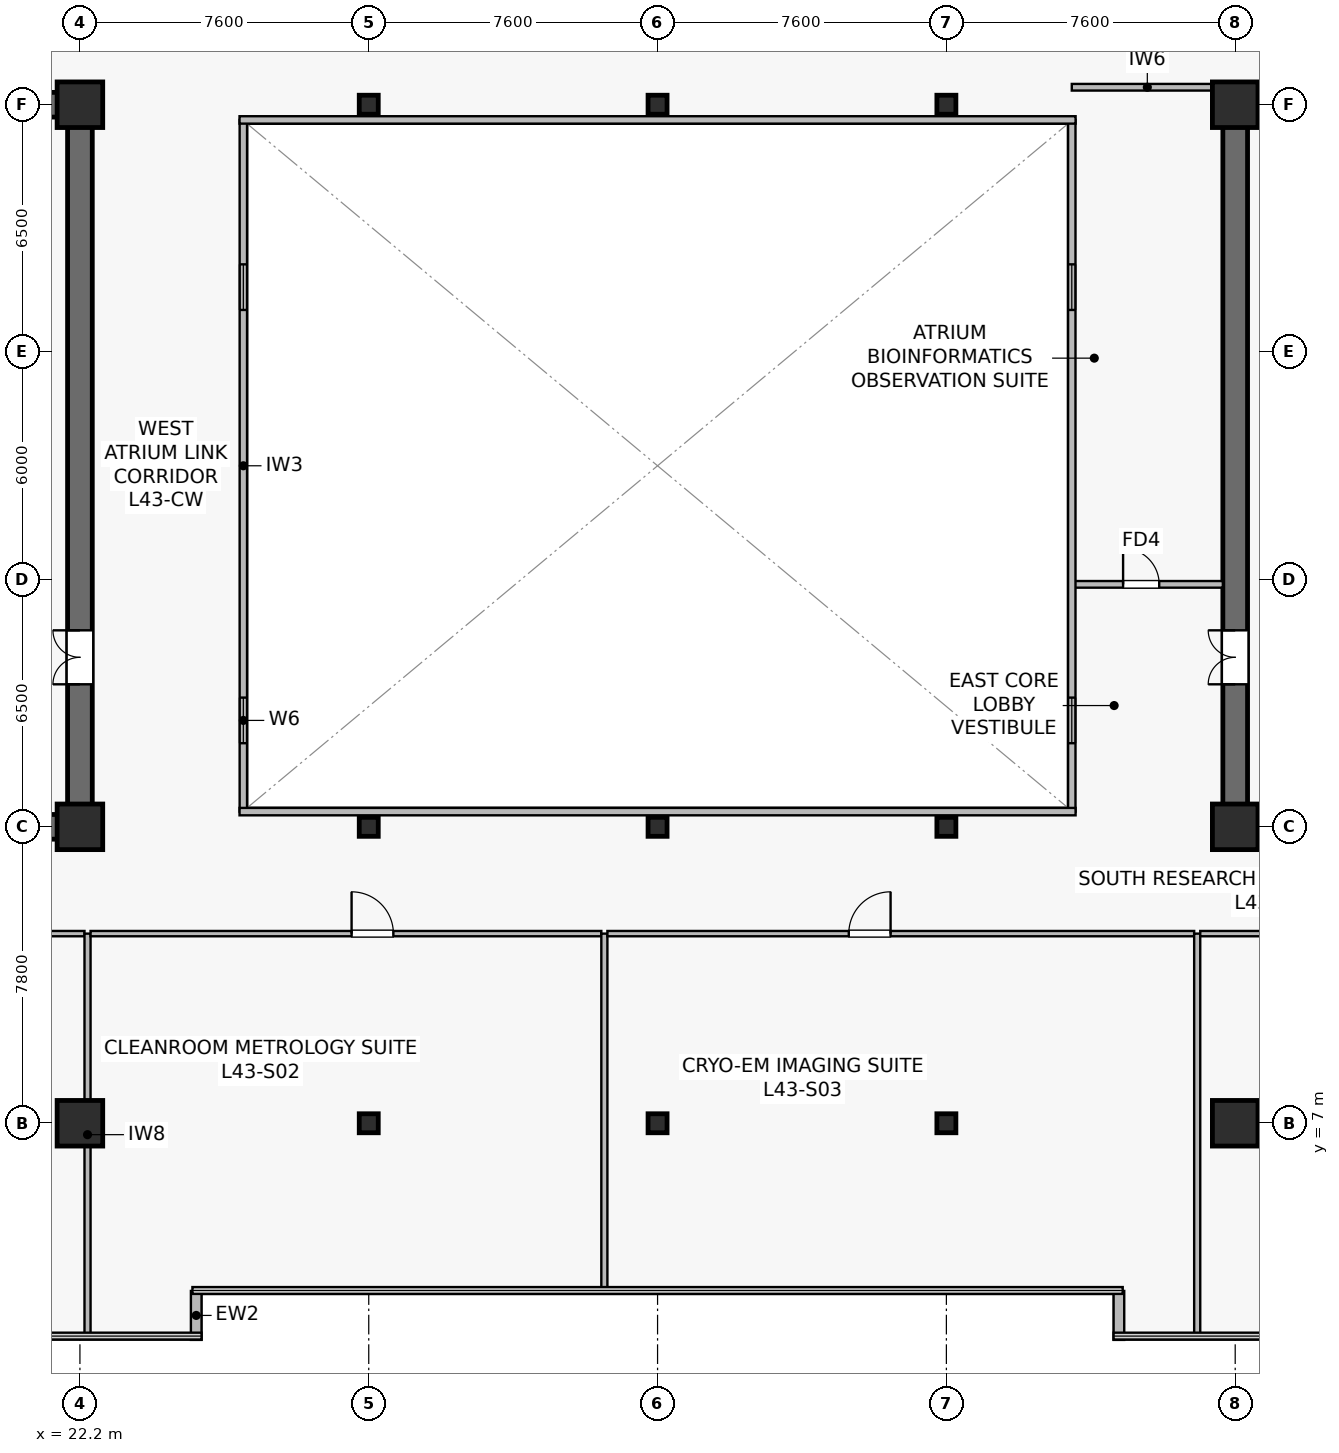
"""IFC4 building model, lengths in metres.
Left out: names, types, materials, properties, quantities, classifications, styles, units other than length and angle.
Written with IfcOpenShell. Run it as: python <this file> out.ifc"""

import sys

from ifc_helpers import new_model, si_unit, direction, frame, frame_2d, origin, origin_2d, place, context, subcontext, project, spatial, rectangle, hollow_rectangle, extrude, source, transform, mapped, element, fill, save


model = new_model("IFC4")
c1 = context("Model", 3, precision=1e-05, world=origin(), true_north=direction((0.0, 1.0)))
c2 = subcontext(c1, "Body", "Model", "MODEL_VIEW")
j1 = project(units=[si_unit("LENGTHUNIT", "METRE"), si_unit("PLANEANGLEUNIT", "RADIAN")], contexts=[c1])
p1 = place(None, origin())
s1 = spatial("IfcSite", under=j1, at=p1, CompositionType="ELEMENT")
p2 = place(p1, origin())
s2 = spatial("IfcBuilding", under=s1, at=p2, CompositionType="ELEMENT")
p3 = place(p2, frame((0.0, 0.0, 178.9)))
s3 = spatial("IfcBuildingStorey", under=s2, at=p3, CompositionType="ELEMENT", Elevation=178.9)
p4 = place(p3, frame((7.075, 14.8, 0.0), z_axis=(0.0, 0.0, 1.0), x_axis=(1.0, 0.0, 0.0)))
e1 = element("IfcWall", 1, at=p4, inside=s3, PredefinedType="SHEAR", context=c2, shape_type="SweptSolid", body=[
    extrude(rectangle(XDim=15.45, YDim=0.65, at=frame_2d((7.725, 0.0))), origin(), (0.0, 0.0, 1.0), 3.79),
])
p5 = place(p3, frame((7.075, 33.8, 0.0), z_axis=(0.0, 0.0, 1.0), x_axis=(1.0, 0.0, 0.0)))
e2 = element("IfcWall", 2, at=p5, inside=s3, PredefinedType="SHEAR", context=c2, shape_type="SweptSolid", body=[
    extrude(rectangle(XDim=15.45, YDim=0.65, at=frame_2d((7.725, 0.0))), origin(), (0.0, 0.0, 1.0), 3.79),
])
p6 = place(p5, frame((6.825, 0.0, 0.0)))
e3 = element("IfcOpeningElement", 3, at=p6, cuts=e2, PredefinedType="OPENING", context=c2, shape_type="SweptSolid", body=[
    extrude(rectangle(XDim=0.95, YDim=2.15, at=frame_2d((0.475, 1.075))), frame((0.0, 0.335, 0.0), z_axis=(0.0, -1.0, 0.0), x_axis=(1.0, 0.0, 0.0)), (0.0, 0.0, 1.0), 0.67),
])
p7 = place(p5, frame((11.89, 0.0, 0.0)))
e4 = element("IfcOpeningElement", 4, at=p7, cuts=e2, PredefinedType="OPENING", context=c2, shape_type="SweptSolid", body=[
    extrude(rectangle(XDim=0.95, YDim=2.15, at=frame_2d((0.475, 1.075))), frame((0.0, 0.335, 0.0), z_axis=(0.0, -1.0, 0.0), x_axis=(1.0, 0.0, 0.0)), (0.0, 0.0, 1.0), 0.67),
])
p8 = place(p3, frame((22.2, 15.125, 0.0), z_axis=(0.0, 0.0, 1.0), x_axis=(0.0, 1.0, 0.0)))
e5 = element("IfcWall", 5, at=p8, inside=s3, PredefinedType="SHEAR", context=c2, shape_type="SweptSolid", body=[
    extrude(rectangle(XDim=18.35, YDim=0.65, at=frame_2d((9.175, 0.0))), origin(), (0.0, 0.0, 1.0), 3.79),
])
p9 = place(p8, frame((3.425, 0.0, 0.0)))
e6 = element("IfcOpeningElement", 6, at=p9, cuts=e5, PredefinedType="OPENING", context=c2, shape_type="SweptSolid", body=[
    extrude(rectangle(XDim=1.42, YDim=2.2, at=frame_2d((0.71, 1.1))), frame((0.0, 0.335, 0.0), z_axis=(0.0, -1.0, 0.0), x_axis=(1.0, 0.0, 0.0)), (0.0, 0.0, 1.0), 0.67),
])
p10 = place(p3, frame((52.275, 14.8, 0.0), z_axis=(0.0, 0.0, 1.0), x_axis=(1.0, 0.0, 0.0)))
e7 = element("IfcWall", 7, at=p10, inside=s3, PredefinedType="SHEAR", context=c2, shape_type="SweptSolid", body=[
    extrude(rectangle(XDim=15.45, YDim=0.65, at=frame_2d((7.725, 0.0))), origin(), (0.0, 0.0, 1.0), 3.79),
])
p11 = place(p3, frame((52.275, 33.8, 0.0), z_axis=(0.0, 0.0, 1.0), x_axis=(1.0, 0.0, 0.0)))
e8 = element("IfcWall", 8, at=p11, inside=s3, PredefinedType="SHEAR", context=c2, shape_type="SweptSolid", body=[
    extrude(rectangle(XDim=15.45, YDim=0.65, at=frame_2d((7.725, 0.0))), origin(), (0.0, 0.0, 1.0), 3.79),
])
p12 = place(p11, frame((7.675, 0.0, 0.0)))
e9 = element("IfcOpeningElement", 9, at=p12, cuts=e8, PredefinedType="OPENING", context=c2, shape_type="SweptSolid", body=[
    extrude(rectangle(XDim=0.95, YDim=2.15, at=frame_2d((0.475, 1.075))), frame((0.0, 0.335, 0.0), z_axis=(0.0, -1.0, 0.0), x_axis=(1.0, 0.0, 0.0)), (0.0, 0.0, 1.0), 0.67),
])
p13 = place(p11, frame((2.61, 0.0, 0.0)))
e10 = element("IfcOpeningElement", 10, at=p13, cuts=e8, PredefinedType="OPENING", context=c2, shape_type="SweptSolid", body=[
    extrude(rectangle(XDim=0.95, YDim=2.15, at=frame_2d((0.475, 1.075))), frame((0.0, 0.335, 0.0), z_axis=(0.0, -1.0, 0.0), x_axis=(1.0, 0.0, 0.0)), (0.0, 0.0, 1.0), 0.67),
])
p14 = place(p3, frame((52.6, 15.125, 0.0), z_axis=(0.0, 0.0, 1.0), x_axis=(0.0, 1.0, 0.0)))
e11 = element("IfcWall", 11, at=p14, inside=s3, PredefinedType="SHEAR", context=c2, shape_type="SweptSolid", body=[
    extrude(rectangle(XDim=18.35, YDim=0.65, at=frame_2d((9.175, 0.0))), origin(), (0.0, 0.0, 1.0), 3.79),
])
p15 = place(p14, frame((3.425, 0.0, 0.0)))
e12 = element("IfcOpeningElement", 12, at=p15, cuts=e11, PredefinedType="OPENING", context=c2, shape_type="SweptSolid", body=[
    extrude(rectangle(XDim=1.42, YDim=2.2, at=frame_2d((0.71, 1.1))), frame((0.0, 0.335, 0.0), z_axis=(0.0, -1.0, 0.0), x_axis=(1.0, 0.0, 0.0)), (0.0, 0.0, 1.0), 0.67),
])
m1 = source(origin(), c2, "Body", "SweptSolid", [
    extrude(rectangle(XDim=1.2, YDim=1.2, at=origin_2d()), origin(), (0.0, 0.0, 1.0), 4.1),
])
for number, where, z_axis, x_axis in (
    (13, (22.2, 7.0, 0.0), (0.0, 0.0, 1.0), (1.0, 0.0, 0.0)),
    (14, (22.2, 14.8, 0.0), (0.0, 0.0, 1.0), (1.0, 0.0, 0.0)),
    (15, (22.2, 33.8, 0.0), (0.0, 0.0, 1.0), (1.0, 0.0, 0.0)),
    (16, (52.6, 7.0, 0.0), (0.0, 0.0, 1.0), (1.0, 0.0, 0.0)),
    (17, (52.6, 14.8, 0.0), (0.0, 0.0, 1.0), (1.0, 0.0, 0.0)),
    (18, (52.6, 33.8, 0.0), (0.0, 0.0, 1.0), (1.0, 0.0, 0.0)),
):
    element("IfcColumn", number, at=place(p3, frame(where, z_axis=z_axis, x_axis=x_axis)), inside=s3, PredefinedType="COLUMN", context=c2, shape_type="MappedRepresentation", body=[
        mapped(m1, transform((0.0, 0.0, 0.0), scale=1.0)),
    ])
m2 = source(origin(), c2, "Body", "SweptSolid", [
    extrude(hollow_rectangle(XDim=0.5, YDim=0.5, WallThickness=0.022, at=origin_2d()), origin(), (0.0, 0.0, 1.0), 4.1),
])
for number, where, z_axis, x_axis in (
    (19, (29.8, 7.0, 0.0), (0.0, 0.0, 1.0), (1.0, 0.0, 0.0)),
    (20, (29.8, 14.8, 0.0), (0.0, 0.0, 1.0), (1.0, 0.0, 0.0)),
    (21, (29.8, 33.8, 0.0), (0.0, 0.0, 1.0), (1.0, 0.0, 0.0)),
    (22, (37.4, 7.0, 0.0), (0.0, 0.0, 1.0), (1.0, 0.0, 0.0)),
    (23, (37.4, 14.8, 0.0), (0.0, 0.0, 1.0), (1.0, 0.0, 0.0)),
    (24, (37.4, 33.8, 0.0), (0.0, 0.0, 1.0), (1.0, 0.0, 0.0)),
    (25, (45.0, 7.0, 0.0), (0.0, 0.0, 1.0), (1.0, 0.0, 0.0)),
    (26, (45.0, 14.8, 0.0), (0.0, 0.0, 1.0), (1.0, 0.0, 0.0)),
    (27, (45.0, 33.8, 0.0), (0.0, 0.0, 1.0), (1.0, 0.0, 0.0)),
):
    element("IfcColumn", number, at=place(p3, frame(where, z_axis=z_axis, x_axis=x_axis)), inside=s3, PredefinedType="COLUMN", context=c2, shape_type="MappedRepresentation", body=[
        mapped(m2, transform((0.0, 0.0, 0.0), scale=1.0)),
    ])
for number, where, z_axis, x_axis in (
    (28, (25.26, 1.3, 0.0), (0.0, 0.0, 1.0), (0.0, 1.0, 0.0)),
    (29, (49.54, 2.588, 0.0), (0.0, 0.0, 1.0), (0.0, -1.0, 0.0)),
):
    element("IfcWall", number, at=place(p3, frame(where, z_axis=z_axis, x_axis=x_axis)), inside=s3, PredefinedType="STANDARD", context=c2, shape_type="SweptSolid", body=[
        extrude(rectangle(XDim=1.288, YDim=0.28, at=frame_2d((0.644, 0.0))), origin(), (0.0, 0.0, 1.0), 3.79),
    ])
p16 = place(p3, frame((48.3, 34.26, 0.0), z_axis=(0.0, 0.0, 1.0), x_axis=(1.0, 0.0, 0.0)))
e30 = element("IfcWall", 30, at=p16, inside=s3, PredefinedType="PARTITIONING", context=c2, shape_type="SweptSolid", body=[
    extrude(rectangle(XDim=3.975, YDim=0.175, at=frame_2d((1.987, 0.0))), origin(), (0.0, 0.0, 1.0), 3.475),
])
p17 = place(p3, frame((48.3, 21.18, 0.0), z_axis=(0.0, 0.0, 1.0), x_axis=(1.0, 0.0, 0.0)))
e31 = element("IfcWall", 31, at=p17, inside=s3, PredefinedType="PARTITIONING", context=c2, shape_type="SweptSolid", body=[
    extrude(rectangle(XDim=3.975, YDim=0.175, at=frame_2d((1.987, 0.0))), origin(), (0.0, 0.0, 1.0), 3.79),
])
p18 = place(p17, frame((1.35, 0.0, 0.0)))
e32 = element("IfcOpeningElement", 32, at=p18, cuts=e31, PredefinedType="OPENING", context=c2, shape_type="SweptSolid", body=[
    extrude(rectangle(XDim=0.95, YDim=2.15, at=frame_2d((0.475, 1.075))), frame((0.0, 0.098, 0.0), z_axis=(0.0, -1.0, 0.0), x_axis=(1.0, 0.0, 0.0)), (0.0, 0.0, 1.0), 0.195),
])
p19 = place(p3, frame((26.5, 15.2, 0.0), z_axis=(0.0, 0.0, 1.0), x_axis=(0.0, 1.0, 0.0)))
e33 = element("IfcWall", 33, at=p19, inside=s3, PredefinedType="SOLIDWALL", context=c2, shape_type="SweptSolid", body=[
    extrude(rectangle(XDim=18.2, YDim=0.195, at=frame_2d((9.1, 0.0))), origin(), (0.0, 0.0, 1.0), 3.79),
])
p20 = place(p19, frame((1.8, 0.0, 0.9)))
e34 = element("IfcOpeningElement", 34, at=p20, cuts=e33, PredefinedType="OPENING", context=c2, shape_type="SweptSolid", body=[
    extrude(rectangle(XDim=1.2, YDim=1.35, at=frame_2d((0.6, 0.675))), frame((0.0, 0.107, 0.0), z_axis=(0.0, -1.0, 0.0), x_axis=(1.0, 0.0, 0.0)), (0.0, 0.0, 1.0), 0.215),
])
p21 = place(p19, frame((13.2, 0.0, 0.9)))
e35 = element("IfcOpeningElement", 35, at=p21, cuts=e33, PredefinedType="OPENING", context=c2, shape_type="SweptSolid", body=[
    extrude(rectangle(XDim=1.2, YDim=1.35, at=frame_2d((0.6, 0.675))), frame((0.0, 0.107, 0.0), z_axis=(0.0, -1.0, 0.0), x_axis=(1.0, 0.0, 0.0)), (0.0, 0.0, 1.0), 0.215),
])
p22 = place(p3, frame((48.3, 15.2, 0.0), z_axis=(0.0, 0.0, 1.0), x_axis=(0.0, 1.0, 0.0)))
e36 = element("IfcWall", 36, at=p22, inside=s3, PredefinedType="SOLIDWALL", context=c2, shape_type="SweptSolid", body=[
    extrude(rectangle(XDim=18.2, YDim=0.195, at=frame_2d((9.1, 0.0))), origin(), (0.0, 0.0, 1.0), 3.79),
])
p23 = place(p22, frame((1.8, 0.0, 0.9)))
e37 = element("IfcOpeningElement", 37, at=p23, cuts=e36, PredefinedType="OPENING", context=c2, shape_type="SweptSolid", body=[
    extrude(rectangle(XDim=1.2, YDim=1.35, at=frame_2d((0.6, 0.675))), frame((0.0, 0.107, 0.0), z_axis=(0.0, -1.0, 0.0), x_axis=(1.0, 0.0, 0.0)), (0.0, 0.0, 1.0), 0.215),
])
p24 = place(p22, frame((13.2, 0.0, 0.9)))
e38 = element("IfcOpeningElement", 38, at=p24, cuts=e36, PredefinedType="OPENING", context=c2, shape_type="SweptSolid", body=[
    extrude(rectangle(XDim=1.2, YDim=1.35, at=frame_2d((0.6, 0.675))), frame((0.0, 0.107, 0.0), z_axis=(0.0, -1.0, 0.0), x_axis=(1.0, 0.0, 0.0)), (0.0, 0.0, 1.0), 0.215),
])
for number, where, z_axis, x_axis in (
    (39, (26.4, 15.2, 0.0), (0.0, 0.0, 1.0), (1.0, 0.0, 0.0)),
    (40, (26.4, 33.4, 0.0), (0.0, 0.0, 1.0), (1.0, 0.0, 0.0)),
):
    element("IfcWall", number, at=place(p3, frame(where, z_axis=z_axis, x_axis=x_axis)), inside=s3, PredefinedType="SOLIDWALL", context=c2, shape_type="SweptSolid", body=[
        extrude(rectangle(XDim=22.0, YDim=0.195, at=frame_2d((11.0, 0.0))), origin(), (0.0, 0.0, 1.0), 3.79),
    ])
p25 = place(p3, frame((6.98, 11.99, 0.0), z_axis=(0.0, 0.0, 1.0), x_axis=(1.0, 0.0, 0.0)))
e41 = element("IfcWall", 41, at=p25, inside=s3, PredefinedType="PARTITIONING", context=c2, shape_type="SweptSolid", body=[
    extrude(rectangle(XDim=15.34, YDim=0.14, at=frame_2d((7.67, 0.0))), origin(), (0.0, 0.0, 1.0), 3.187),
])
p26 = place(p25, frame((6.308, 0.0, 0.0)))
e42 = element("IfcOpeningElement", 42, at=p26, cuts=e41, PredefinedType="OPENING", context=c2, shape_type="SweptSolid", body=[
    extrude(rectangle(XDim=1.1, YDim=2.18, at=frame_2d((0.55, 1.09))), frame((0.0, 0.08, 0.0), z_axis=(0.0, -1.0, 0.0), x_axis=(1.0, 0.0, 0.0)), (0.0, 0.0, 1.0), 0.16),
])
p27 = place(p3, frame((22.4, 1.41, 0.0), z_axis=(0.0, 0.0, 1.0), x_axis=(0.0, 1.0, 0.0)))
e43 = element("IfcWall", 43, at=p27, inside=s3, PredefinedType="PARTITIONING", context=c2, shape_type="SweptSolid", body=[
    extrude(rectangle(XDim=10.58, YDim=0.16, at=frame_2d((5.29, 0.0))), origin(), (0.0, 0.0, 1.0), 3.075),
])
p28 = place(p3, frame((22.48, 11.99, 0.0), z_axis=(0.0, 0.0, 1.0), x_axis=(1.0, 0.0, 0.0)))
e44 = element("IfcWall", 44, at=p28, inside=s3, PredefinedType="PARTITIONING", context=c2, shape_type="SweptSolid", body=[
    extrude(rectangle(XDim=13.44, YDim=0.14, at=frame_2d((6.72, 0.0))), origin(), (0.0, 0.0, 1.0), 3.187),
])
p29 = place(p28, frame((6.868, 0.0, 0.0)))
e45 = element("IfcOpeningElement", 45, at=p29, cuts=e44, PredefinedType="OPENING", context=c2, shape_type="SweptSolid", body=[
    extrude(rectangle(XDim=1.1, YDim=2.18, at=frame_2d((0.55, 1.09))), frame((0.0, 0.08, 0.0), z_axis=(0.0, -1.0, 0.0), x_axis=(1.0, 0.0, 0.0)), (0.0, 0.0, 1.0), 0.16),
])
p30 = place(p3, frame((36.0, 2.61, 0.0), z_axis=(0.0, 0.0, 1.0), x_axis=(0.0, 1.0, 0.0)))
e46 = element("IfcWall", 46, at=p30, inside=s3, PredefinedType="PARTITIONING", context=c2, shape_type="SweptSolid", body=[
    extrude(rectangle(XDim=9.38, YDim=0.16, at=frame_2d((4.69, 0.0))), origin(), (0.0, 0.0, 1.0), 3.075),
])
p31 = place(p3, frame((36.08, 11.99, 0.0), z_axis=(0.0, 0.0, 1.0), x_axis=(1.0, 0.0, 0.0)))
e47 = element("IfcWall", 47, at=p31, inside=s3, PredefinedType="PARTITIONING", context=c2, shape_type="SweptSolid", body=[
    extrude(rectangle(XDim=15.44, YDim=0.14, at=frame_2d((7.72, 0.0))), origin(), (0.0, 0.0, 1.0), 3.187),
])
p32 = place(p31, frame((6.352, 0.0, 0.0)))
e48 = element("IfcOpeningElement", 48, at=p32, cuts=e47, PredefinedType="OPENING", context=c2, shape_type="SweptSolid", body=[
    extrude(rectangle(XDim=1.1, YDim=2.18, at=frame_2d((0.55, 1.09))), frame((0.0, 0.08, 0.0), z_axis=(0.0, -1.0, 0.0), x_axis=(1.0, 0.0, 0.0)), (0.0, 0.0, 1.0), 0.16),
])
p33 = place(p3, frame((51.6, 1.41, 0.0), z_axis=(0.0, 0.0, 1.0), x_axis=(0.0, 1.0, 0.0)))
e49 = element("IfcWall", 49, at=p33, inside=s3, PredefinedType="PARTITIONING", context=c2, shape_type="SweptSolid", body=[
    extrude(rectangle(XDim=10.58, YDim=0.16, at=frame_2d((5.29, 0.0))), origin(), (0.0, 0.0, 1.0), 3.075),
])
p34 = place(p3, frame((51.68, 11.99, 0.0), z_axis=(0.0, 0.0, 1.0), x_axis=(1.0, 0.0, 0.0)))
e50 = element("IfcWall", 50, at=p34, inside=s3, PredefinedType="PARTITIONING", context=c2, shape_type="SweptSolid", body=[
    extrude(rectangle(XDim=16.14, YDim=0.14, at=frame_2d((8.07, 0.0))), origin(), (0.0, 0.0, 1.0), 3.187),
])
p35 = place(p34, frame((8.38, 0.0, 0.0)))
e51 = element("IfcOpeningElement", 51, at=p35, cuts=e50, PredefinedType="OPENING", context=c2, shape_type="SweptSolid", body=[
    extrude(rectangle(XDim=1.1, YDim=2.18, at=frame_2d((0.55, 1.09))), frame((0.0, 0.08, 0.0), z_axis=(0.0, -1.0, 0.0), x_axis=(1.0, 0.0, 0.0)), (0.0, 0.0, 1.0), 0.16),
])
m3 = source(origin(), c2, "Body", "SweptSolid", [
    extrude(rectangle(XDim=1.2, YDim=1.35, at=frame_2d((0.6, 0.675))), frame((0.0, 0.03, 0.0), z_axis=(0.0, -1.0, 0.0), x_axis=(1.0, 0.0, 0.0)), (0.0, 0.0, 1.0), 0.06),
])
p36 = place(p20, origin())
e52 = element("IfcWindow", 52, at=p36, inside=s3, PartitioningType="SINGLE_PANEL", PredefinedType="WINDOW", context=c2, shape_type="MappedRepresentation", body=[
    mapped(m3, transform((0.0, 0.0, 0.0), scale=1.0)),
])
fill(e34, e52)
p37 = place(p21, origin())
e53 = element("IfcWindow", 53, at=p37, inside=s3, PartitioningType="SINGLE_PANEL", PredefinedType="WINDOW", context=c2, shape_type="MappedRepresentation", body=[
    mapped(m3, transform((0.0, 0.0, 0.0), scale=1.0)),
])
fill(e35, e53)
p38 = place(p23, origin())
e54 = element("IfcWindow", 54, at=p38, inside=s3, PartitioningType="SINGLE_PANEL", PredefinedType="WINDOW", context=c2, shape_type="MappedRepresentation", body=[
    mapped(m3, transform((0.0, 0.0, 0.0), scale=1.0)),
])
fill(e37, e54)
p39 = place(p24, origin())
e55 = element("IfcWindow", 55, at=p39, inside=s3, PartitioningType="SINGLE_PANEL", PredefinedType="WINDOW", context=c2, shape_type="MappedRepresentation", body=[
    mapped(m3, transform((0.0, 0.0, 0.0), scale=1.0)),
])
fill(e38, e55)
m4 = source(origin(), c2, "Body", "SweptSolid", [
    extrude(rectangle(XDim=1.42, YDim=2.2, at=frame_2d((0.71, 1.1))), frame((0.0, 0.025, 0.0), z_axis=(0.0, -1.0, 0.0), x_axis=(1.0, 0.0, 0.0)), (0.0, 0.0, 1.0), 0.05),
])
p40 = place(p9, origin())
e56 = element("IfcDoor", 56, at=p40, inside=s3, OperationType="DOUBLE_DOOR_SINGLE_SWING", PredefinedType="DOOR", context=c2, shape_type="MappedRepresentation", body=[
    mapped(m4, transform((0.0, 0.0, 0.0), scale=1.0)),
])
fill(e6, e56)
p41 = place(p15, origin())
e57 = element("IfcDoor", 57, at=p41, inside=s3, OperationType="DOUBLE_DOOR_SINGLE_SWING", PredefinedType="DOOR", context=c2, shape_type="MappedRepresentation", body=[
    mapped(m4, transform((0.0, 0.0, 0.0), scale=1.0)),
])
fill(e12, e57)
m5 = source(origin(), c2, "Body", "SweptSolid", [
    extrude(rectangle(XDim=0.95, YDim=2.15, at=frame_2d((0.475, 1.075))), frame((0.0, 0.025, 0.0), z_axis=(0.0, -1.0, 0.0), x_axis=(1.0, 0.0, 0.0)), (0.0, 0.0, 1.0), 0.05),
])
p42 = place(p18, origin())
e58 = element("IfcDoor", 58, at=p42, inside=s3, OperationType="SINGLE_SWING_LEFT", PredefinedType="DOOR", context=c2, shape_type="MappedRepresentation", body=[
    mapped(m5, transform((0.0, 0.0, 0.0), scale=1.0)),
])
fill(e32, e58)
m6 = source(origin(), c2, "Body", "SweptSolid", [
    extrude(rectangle(XDim=1.1, YDim=2.18, at=frame_2d((0.55, 1.09))), frame((0.0, 0.025, 0.0), z_axis=(0.0, -1.0, 0.0), x_axis=(1.0, 0.0, 0.0)), (0.0, 0.0, 1.0), 0.05),
])
p43 = place(p29, origin())
e59 = element("IfcDoor", 59, at=p43, inside=s3, OperationType="SINGLE_SWING_LEFT", PredefinedType="DOOR", context=c2, shape_type="MappedRepresentation", body=[
    mapped(m6, transform((0.0, 0.0, 0.0), scale=1.0)),
])
fill(e45, e59)
p44 = place(p32, origin())
e60 = element("IfcDoor", 60, at=p44, inside=s3, OperationType="SINGLE_SWING_RIGHT", PredefinedType="DOOR", context=c2, shape_type="MappedRepresentation", body=[
    mapped(m6, transform((0.0, 0.0, 0.0), scale=1.0)),
])
fill(e48, e60)
save(model, sys.argv[1])
